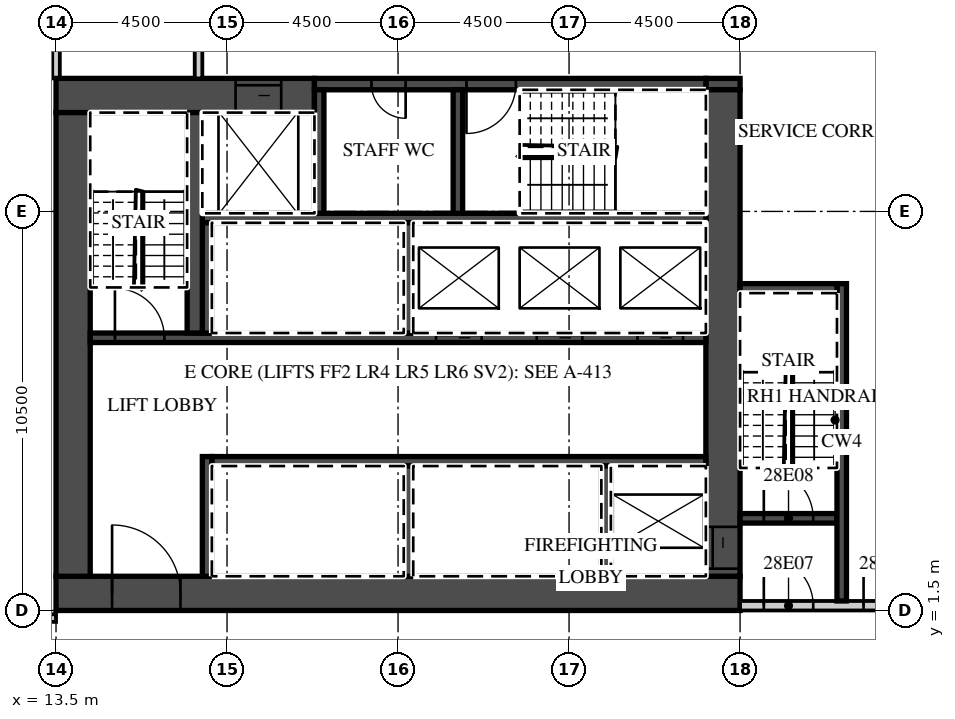
"""IFC4 building model, lengths in metres.
Left out: names, types, materials, properties, quantities, classifications, styles, units other than length and angle.
Written with IfcOpenShell. Run it as: python <this file> out.ifc"""

import sys

from ifc_helpers import new_model, si_unit, direction, frame, frame_2d, origin, place, context, subcontext, project, spatial, rectangle, extrude, element, fill, save


model = new_model("IFC4")
c1 = context("Model", 3, precision=1e-05, world=origin(), true_north=direction((0.0, 1.0)))
c2 = subcontext(c1, "Body", "Model", "MODEL_VIEW")
j1 = project(units=[si_unit("LENGTHUNIT", "METRE"), si_unit("PLANEANGLEUNIT", "RADIAN")], contexts=[c1])
p1 = place(None, origin())
s1 = spatial("IfcSite", under=j1, at=p1, CompositionType="ELEMENT")
p2 = place(p1, origin())
s2 = spatial("IfcBuilding", under=s1, at=p2, CompositionType="ELEMENT")
p3 = place(p2, frame((0.0, 0.0, 127.3)))
s3 = spatial("IfcBuildingStorey", under=s2, at=p3, CompositionType="ELEMENT", Elevation=127.3)
p4 = place(p3, frame((13.5, 15.5, 0.0), z_axis=(0.0, 0.0, 1.0), x_axis=(0.0, 1.0, 0.0)))
e1 = element("IfcWall", 1, at=p4, inside=s3, PredefinedType="PARTITIONING", context=c2, shape_type="SweptSolid", body=[
    extrude(rectangle(XDim=7.162, YDim=0.2, at=frame_2d((3.581, 0.0))), origin(), (0.0, 0.0, 1.0), 3.02),
])
p5 = place(p3, frame((-39.316, 1.3, 0.0), z_axis=(0.0, 0.0, 1.0), x_axis=(1.0, 0.0, 0.0)))
e2 = element("IfcWall", 2, at=p5, inside=s3, PredefinedType="PARTITIONING", context=c2, shape_type="SweptSolid", body=[
    extrude(rectangle(XDim=52.816, YDim=0.2, at=frame_2d((26.408, 0.0))), origin(), (0.0, 0.0, 1.0), 3.02),
])
p6 = place(p5, frame((0.15, 0.0, 0.0)))
e3 = element("IfcOpeningElement", 3, at=p6, cuts=e2, PredefinedType="OPENING", context=c2, shape_type="SweptSolid", body=[
    extrude(rectangle(XDim=0.9, YDim=2.1, at=frame_2d((0.45, 1.05))), frame((0.0, 0.11, 0.0), z_axis=(0.0, -1.0, 0.0), x_axis=(1.0, 0.0, 0.0)), (0.0, 0.0, 1.0), 0.22),
])
p7 = place(p5, frame((3.891, 0.0, 0.0)))
e4 = element("IfcOpeningElement", 4, at=p7, cuts=e2, PredefinedType="OPENING", context=c2, shape_type="SweptSolid", body=[
    extrude(rectangle(XDim=1.0, YDim=2.1, at=frame_2d((0.5, 1.05))), frame((0.0, 0.11, 0.0), z_axis=(0.0, -1.0, 0.0), x_axis=(1.0, 0.0, 0.0)), (0.0, 0.0, 1.0), 0.22),
])
p8 = place(p5, frame((10.741, 0.0, 0.0)))
e5 = element("IfcOpeningElement", 5, at=p8, cuts=e2, PredefinedType="OPENING", context=c2, shape_type="SweptSolid", body=[
    extrude(rectangle(XDim=1.0, YDim=2.1, at=frame_2d((0.5, 1.05))), frame((0.0, 0.11, 0.0), z_axis=(0.0, -1.0, 0.0), x_axis=(1.0, 0.0, 0.0)), (0.0, 0.0, 1.0), 0.22),
])
p9 = place(p5, frame((15.266, 0.0, 0.0)))
e6 = element("IfcOpeningElement", 6, at=p9, cuts=e2, PredefinedType="OPENING", context=c2, shape_type="SweptSolid", body=[
    extrude(rectangle(XDim=1.0, YDim=2.1, at=frame_2d((0.5, 1.05))), frame((0.0, 0.11, 0.0), z_axis=(0.0, -1.0, 0.0), x_axis=(1.0, 0.0, 0.0)), (0.0, 0.0, 1.0), 0.22),
])
p10 = place(p5, frame((19.741, 0.0, 0.0)))
e7 = element("IfcOpeningElement", 7, at=p10, cuts=e2, PredefinedType="OPENING", context=c2, shape_type="SweptSolid", body=[
    extrude(rectangle(XDim=1.0, YDim=2.1, at=frame_2d((0.5, 1.05))), frame((0.0, 0.11, 0.0), z_axis=(0.0, -1.0, 0.0), x_axis=(1.0, 0.0, 0.0)), (0.0, 0.0, 1.0), 0.22),
])
p11 = place(p5, frame((26.678, 0.0, 0.0)))
e8 = element("IfcOpeningElement", 8, at=p11, cuts=e2, PredefinedType="OPENING", context=c2, shape_type="SweptSolid", body=[
    extrude(rectangle(XDim=1.2, YDim=2.1, at=frame_2d((0.6, 1.05))), frame((0.0, 0.11, 0.0), z_axis=(0.0, -1.0, 0.0), x_axis=(1.0, 0.0, 0.0)), (0.0, 0.0, 1.0), 0.22),
])
p12 = place(p5, frame((35.678, 0.0, 0.0)))
e9 = element("IfcOpeningElement", 9, at=p12, cuts=e2, PredefinedType="OPENING", context=c2, shape_type="SweptSolid", body=[
    extrude(rectangle(XDim=1.2, YDim=2.1, at=frame_2d((0.6, 1.05))), frame((0.0, 0.11, 0.0), z_axis=(0.0, -1.0, 0.0), x_axis=(1.0, 0.0, 0.0)), (0.0, 0.0, 1.0), 0.22),
])
p13 = place(p5, frame((41.754, 0.0, 0.0)))
e10 = element("IfcOpeningElement", 10, at=p13, cuts=e2, PredefinedType="OPENING", context=c2, shape_type="SweptSolid", body=[
    extrude(rectangle(XDim=1.2, YDim=2.1, at=frame_2d((0.6, 1.05))), frame((0.0, 0.11, 0.0), z_axis=(0.0, -1.0, 0.0), x_axis=(1.0, 0.0, 0.0)), (0.0, 0.0, 1.0), 0.22),
])
p14 = place(p5, frame((51.241, 0.0, 0.0)))
e11 = element("IfcOpeningElement", 11, at=p14, cuts=e2, PredefinedType="OPENING", context=c2, shape_type="SweptSolid", body=[
    extrude(rectangle(XDim=1.0, YDim=2.1, at=frame_2d((0.5, 1.05))), frame((0.0, 0.11, 0.0), z_axis=(0.0, -1.0, 0.0), x_axis=(1.0, 0.0, 0.0)), (0.0, 0.0, 1.0), 0.22),
])
p15 = place(p3, frame((13.5, 1.95, 0.0), z_axis=(0.0, 0.0, 1.0), x_axis=(1.0, 0.0, 0.0)))
e12 = element("IfcWall", 12, at=p15, inside=s3, PredefinedType="SHEAR", context=c2, shape_type="SweptSolid", body=[
    extrude(rectangle(XDim=18.0, YDim=0.9, at=frame_2d((9.0, 0.0))), origin(), (0.0, 0.0, 1.0), 3.02),
])
p16 = place(p15, frame((1.475, 0.0, 0.0)))
e13 = element("IfcOpeningElement", 13, at=p16, cuts=e12, PredefinedType="OPENING", context=c2, shape_type="SweptSolid", body=[
    extrude(rectangle(XDim=1.8, YDim=2.1, at=frame_2d((0.9, 1.05))), frame((0.0, 0.46, 0.0), z_axis=(0.0, -1.0, 0.0), x_axis=(1.0, 0.0, 0.0)), (0.0, 0.0, 1.0), 0.92),
])
p17 = place(p3, frame((13.5, 15.05, 0.0), z_axis=(0.0, 0.0, 1.0), x_axis=(1.0, 0.0, 0.0)))
e14 = element("IfcWall", 14, at=p17, inside=s3, PredefinedType="SHEAR", context=c2, shape_type="SweptSolid", body=[
    extrude(rectangle(XDim=6.8, YDim=0.9, at=frame_2d((3.4, 0.0))), origin(), (0.0, 0.0, 1.0), 3.02),
])
p18 = place(p17, frame((4.725, 0.0, 0.0)))
e15 = element("IfcOpeningElement", 15, at=p18, cuts=e14, PredefinedType="OPENING", context=c2, shape_type="SweptSolid", body=[
    extrude(rectangle(XDim=1.2, YDim=2.1, at=frame_2d((0.6, 1.05))), frame((0.0, 0.46, 0.0), z_axis=(0.0, -1.0, 0.0), x_axis=(1.0, 0.0, 0.0)), (0.0, 0.0, 1.0), 0.92),
])
p19 = place(p3, frame((30.6, 15.35, 0.0), z_axis=(0.0, 0.0, 1.0), x_axis=(1.0, 0.0, 0.0)))
e16 = element("IfcWall", 16, at=p19, inside=s3, PredefinedType="SHEAR", context=c2, shape_type="SweptSolid", body=[
    extrude(rectangle(XDim=0.9, YDim=0.3, at=frame_2d((0.45, 0.0))), origin(), (0.0, 0.0, 1.0), 3.02),
])
p20 = place(p3, frame((20.3, 15.35, 0.0), z_axis=(0.0, 0.0, 1.0), x_axis=(1.0, 0.0, 0.0)))
e17 = element("IfcWall", 17, at=p20, inside=s3, PredefinedType="SHEAR", context=c2, shape_type="SweptSolid", body=[
    extrude(rectangle(XDim=10.3, YDim=0.3, at=frame_2d((5.15, 0.0))), origin(), (0.0, 0.0, 1.0), 3.02),
])
p21 = place(p20, frame((4.0, 0.0, 0.0)))
e18 = element("IfcOpeningElement", 18, at=p21, cuts=e17, PredefinedType="OPENING", context=c2, shape_type="SweptSolid", body=[
    extrude(rectangle(XDim=1.3, YDim=2.1, at=frame_2d((0.65, 1.05))), frame((0.0, 0.16, 0.0), z_axis=(0.0, -1.0, 0.0), x_axis=(1.0, 0.0, 0.0)), (0.0, 0.0, 1.0), 0.32),
])
p22 = place(p20, frame((1.5, 0.0, 0.0)))
e19 = element("IfcOpeningElement", 19, at=p22, cuts=e17, PredefinedType="OPENING", context=c2, shape_type="SweptSolid", body=[
    extrude(rectangle(XDim=0.9, YDim=2.1, at=frame_2d((0.45, 1.05))), frame((0.0, 0.16, 0.0), z_axis=(0.0, -1.0, 0.0), x_axis=(1.0, 0.0, 0.0)), (0.0, 0.0, 1.0), 0.32),
])
p23 = place(p3, frame((31.05, 2.4, 0.0), z_axis=(0.0, 0.0, 1.0), x_axis=(0.0, 1.0, 0.0)))
e20 = element("IfcWall", 20, at=p23, inside=s3, PredefinedType="SHEAR", context=c2, shape_type="SweptSolid", body=[
    extrude(rectangle(XDim=12.8, YDim=0.9, at=frame_2d((6.4, 0.0))), origin(), (0.0, 0.0, 1.0), 3.02),
])
p24 = place(p23, frame((0.2, 0.0, 0.0)))
e21 = element("IfcOpeningElement", 21, at=p24, cuts=e20, PredefinedType="OPENING", context=c2, shape_type="SweptSolid", body=[
    extrude(rectangle(XDim=1.1, YDim=2.1, at=frame_2d((0.55, 1.05))), frame((0.0, 0.46, 0.0), z_axis=(0.0, -1.0, 0.0), x_axis=(1.0, 0.0, 0.0)), (0.0, 0.0, 1.0), 0.92),
])
p25 = place(p3, frame((13.95, 2.4, 0.0), z_axis=(0.0, 0.0, 1.0), x_axis=(0.0, 1.0, 0.0)))
e22 = element("IfcWall", 22, at=p25, inside=s3, PredefinedType="SHEAR", context=c2, shape_type="SweptSolid", body=[
    extrude(rectangle(XDim=12.2, YDim=0.9, at=frame_2d((6.1, 0.0))), origin(), (0.0, 0.0, 1.0), 3.02),
])
p26 = place(p3, frame((17.6, 5.425, 0.0), z_axis=(0.0, 0.0, 1.0), x_axis=(1.0, 0.0, 0.0)))
e23 = element("IfcWall", 23, at=p26, inside=s3, PredefinedType="SHEAR", context=c2, shape_type="SweptSolid", body=[
    extrude(rectangle(XDim=13.0, YDim=0.25, at=frame_2d((6.5, 0.0))), origin(), (0.0, 0.0, 1.0), 3.02),
])
p27 = place(p3, frame((17.475, 2.4, 0.0), z_axis=(0.0, 0.0, 1.0), x_axis=(0.0, 1.0, 0.0)))
e24 = element("IfcWall", 24, at=p27, inside=s3, PredefinedType="SHEAR", context=c2, shape_type="SweptSolid", body=[
    extrude(rectangle(XDim=3.15, YDim=0.25, at=frame_2d((1.575, 0.0))), origin(), (0.0, 0.0, 1.0), 3.02),
])
for number, where, z_axis, x_axis in (
    (25, (27.975, 2.4, 0.0), (0.0, 0.0, 1.0), (0.0, 1.0, 0.0)),
    (26, (22.775, 2.4, 0.0), (0.0, 0.0, 1.0), (0.0, 1.0, 0.0)),
):
    element("IfcWall", number, at=place(p3, frame(where, z_axis=z_axis, x_axis=x_axis)), inside=s3, PredefinedType="SHEAR", context=c2, shape_type="SweptSolid", body=[
        extrude(rectangle(XDim=2.9, YDim=0.25, at=frame_2d((1.45, 0.0))), origin(), (0.0, 0.0, 1.0), 3.02),
    ])
p28 = place(p3, frame((14.4, 8.675, 0.0), z_axis=(0.0, 0.0, 1.0), x_axis=(1.0, 0.0, 0.0)))
e27 = element("IfcWall", 27, at=p28, inside=s3, PredefinedType="SHEAR", context=c2, shape_type="SweptSolid", body=[
    extrude(rectangle(XDim=16.2, YDim=0.25, at=frame_2d((8.1, 0.0))), origin(), (0.0, 0.0, 1.0), 3.02),
])
p29 = place(p28, frame((14.4, 0.0, 0.0)))
e28 = element("IfcOpeningElement", 28, at=p29, cuts=e27, PredefinedType="OPENING", context=c2, shape_type="SweptSolid", body=[
    extrude(rectangle(XDim=1.2, YDim=2.1, at=frame_2d((0.6, 1.05))), frame((0.0, 0.135, 0.0), z_axis=(0.0, -1.0, 0.0), x_axis=(1.0, 0.0, 0.0)), (0.0, 0.0, 1.0), 0.27),
])
p30 = place(p28, frame((11.75, 0.0, 0.0)))
e29 = element("IfcOpeningElement", 29, at=p30, cuts=e27, PredefinedType="OPENING", context=c2, shape_type="SweptSolid", body=[
    extrude(rectangle(XDim=1.2, YDim=2.1, at=frame_2d((0.6, 1.05))), frame((0.0, 0.135, 0.0), z_axis=(0.0, -1.0, 0.0), x_axis=(1.0, 0.0, 0.0)), (0.0, 0.0, 1.0), 0.27),
])
p31 = place(p28, frame((9.1, 0.0, 0.0)))
e30 = element("IfcOpeningElement", 30, at=p31, cuts=e27, PredefinedType="OPENING", context=c2, shape_type="SweptSolid", body=[
    extrude(rectangle(XDim=1.2, YDim=2.1, at=frame_2d((0.6, 1.05))), frame((0.0, 0.135, 0.0), z_axis=(0.0, -1.0, 0.0), x_axis=(1.0, 0.0, 0.0)), (0.0, 0.0, 1.0), 0.27),
])
p32 = place(p28, frame((0.65, 0.0, 0.0)))
e31 = element("IfcOpeningElement", 31, at=p32, cuts=e27, PredefinedType="OPENING", context=c2, shape_type="SweptSolid", body=[
    extrude(rectangle(XDim=1.3, YDim=2.1, at=frame_2d((0.65, 1.05))), frame((0.0, 0.135, 0.0), z_axis=(0.0, -1.0, 0.0), x_axis=(1.0, 0.0, 0.0)), (0.0, 0.0, 1.0), 0.27),
])
p33 = place(p3, frame((17.35, 11.825, 0.0), z_axis=(0.0, 0.0, 1.0), x_axis=(1.0, 0.0, 0.0)))
e32 = element("IfcWall", 32, at=p33, inside=s3, PredefinedType="SHEAR", context=c2, shape_type="SweptSolid", body=[
    extrude(rectangle(XDim=13.25, YDim=0.25, at=frame_2d((6.625, 0.0))), origin(), (0.0, 0.0, 1.0), 3.02),
])
for number, where, z_axis, x_axis in (
    (33, (17.475, 8.8, 0.0), (0.0, 0.0, 1.0), (0.0, 1.0, 0.0)),
    (34, (22.775, 8.8, 0.0), (0.0, 0.0, 1.0), (0.0, 1.0, 0.0)),
):
    element("IfcWall", number, at=place(p3, frame(where, z_axis=z_axis, x_axis=x_axis)), inside=s3, PredefinedType="SHEAR", context=c2, shape_type="SweptSolid", body=[
        extrude(rectangle(XDim=2.9, YDim=0.25, at=frame_2d((1.45, 0.0))), origin(), (0.0, 0.0, 1.0), 3.02),
    ])
p34 = place(p3, frame((17.15, 8.8, 0.0), z_axis=(0.0, 0.0, 1.0), x_axis=(0.0, 1.0, 0.0)))
e35 = element("IfcWall", 35, at=p34, inside=s3, PredefinedType="SHEAR", context=c2, shape_type="SweptSolid", body=[
    extrude(rectangle(XDim=5.8, YDim=0.4, at=frame_2d((2.9, 0.0))), origin(), (0.0, 0.0, 1.0), 3.02),
])
for number, where, z_axis, x_axis in (
    (36, (20.425, 11.95, 0.0), (0.0, 0.0, 1.0), (0.0, 1.0, 0.0)),
    (37, (24.075, 11.95, 0.0), (0.0, 0.0, 1.0), (0.0, 1.0, 0.0)),
):
    element("IfcWall", number, at=place(p3, frame(where, z_axis=z_axis, x_axis=x_axis)), inside=s3, PredefinedType="SHEAR", context=c2, shape_type="SweptSolid", body=[
        extrude(rectangle(XDim=3.25, YDim=0.25, at=frame_2d((1.625, 0.0))), origin(), (0.0, 0.0, 1.0), 3.02),
    ])
p35 = place(p3, frame((31.5, 1.625, 0.0), z_axis=(0.0, 0.0, 1.0), x_axis=(1.0, 0.0, 0.0)))
e38 = element("IfcWall", 38, at=p35, inside=s3, PredefinedType="PARTITIONING", context=c2, shape_type="SweptSolid", body=[
    extrude(rectangle(XDim=15.65, YDim=0.25, at=frame_2d((7.825, 0.0))), origin(), (0.0, 0.0, 1.0), 3.02),
])
p36 = place(p35, frame((0.625, 0.0, 0.0)))
e39 = element("IfcOpeningElement", 39, at=p36, cuts=e38, PredefinedType="OPENING", context=c2, shape_type="SweptSolid", body=[
    extrude(rectangle(XDim=1.3, YDim=2.1, at=frame_2d((0.65, 1.05))), frame((0.0, 0.135, 0.0), z_axis=(0.0, -1.0, 0.0), x_axis=(1.0, 0.0, 0.0)), (0.0, 0.0, 1.0), 0.27),
])
p37 = place(p35, frame((3.25, 0.0, 0.0)))
e40 = element("IfcOpeningElement", 40, at=p37, cuts=e38, PredefinedType="OPENING", context=c2, shape_type="SweptSolid", body=[
    extrude(rectangle(XDim=1.1, YDim=2.1, at=frame_2d((0.55, 1.05))), frame((0.0, 0.135, 0.0), z_axis=(0.0, -1.0, 0.0), x_axis=(1.0, 0.0, 0.0)), (0.0, 0.0, 1.0), 0.27),
])
p38 = place(p3, frame((31.5, 3.925, 0.0), z_axis=(0.0, 0.0, 1.0), x_axis=(1.0, 0.0, 0.0)))
e41 = element("IfcWall", 41, at=p38, inside=s3, PredefinedType="SHEAR", context=c2, shape_type="SweptSolid", body=[
    extrude(rectangle(XDim=2.55, YDim=0.25, at=frame_2d((1.275, 0.0))), origin(), (0.0, 0.0, 1.0), 3.02),
])
p39 = place(p38, frame((0.625, 0.0, 0.0)))
e42 = element("IfcOpeningElement", 42, at=p39, cuts=e41, PredefinedType="OPENING", context=c2, shape_type="SweptSolid", body=[
    extrude(rectangle(XDim=1.3, YDim=2.1, at=frame_2d((0.65, 1.05))), frame((0.0, 0.135, 0.0), z_axis=(0.0, -1.0, 0.0), x_axis=(1.0, 0.0, 0.0)), (0.0, 0.0, 1.0), 0.27),
])
p40 = place(p3, frame((34.175, 1.75, 0.0), z_axis=(0.0, 0.0, 1.0), x_axis=(0.0, 1.0, 0.0)))
e43 = element("IfcWall", 43, at=p40, inside=s3, PredefinedType="SHEAR", context=c2, shape_type="SweptSolid", body=[
    extrude(rectangle(XDim=8.35, YDim=0.25, at=frame_2d((4.175, 0.0))), origin(), (0.0, 0.0, 1.0), 3.02),
])
p41 = place(p3, frame((31.5, 9.975, 0.0), z_axis=(0.0, 0.0, 1.0), x_axis=(1.0, 0.0, 0.0)))
e44 = element("IfcWall", 44, at=p41, inside=s3, PredefinedType="SHEAR", context=c2, shape_type="SweptSolid", body=[
    extrude(rectangle(XDim=2.55, YDim=0.25, at=frame_2d((1.275, 0.0))), origin(), (0.0, 0.0, 1.0), 3.02),
])
p42 = place(p3, frame((17.25, 15.5, 0.0), z_axis=(0.0, 0.0, 1.0), x_axis=(0.0, 1.0, 0.0)))
e45 = element("IfcWall", 45, at=p42, inside=s3, PredefinedType="PARTITIONING", context=c2, shape_type="SweptSolid", body=[
    extrude(rectangle(XDim=2.2, YDim=0.2, at=frame_2d((1.1, 0.0))), origin(), (0.0, 0.0, 1.0), 3.02),
])
p43 = place(p29, origin())
e46 = element("IfcDoor", 46, at=p43, inside=s3, OperationType="SLIDING_TO_LEFT", PredefinedType="DOOR", context=c2, shape_type="SweptSolid", body=[
    extrude(rectangle(XDim=1.2, YDim=2.1, at=frame_2d((0.6, 1.05))), frame((0.0, 0.025, 0.0), z_axis=(0.0, -1.0, 0.0), x_axis=(1.0, 0.0, 0.0)), (0.0, 0.0, 1.0), 0.05),
])
fill(e28, e46)
p44 = place(p30, origin())
e47 = element("IfcDoor", 47, at=p44, inside=s3, OperationType="SLIDING_TO_RIGHT", PredefinedType="DOOR", context=c2, shape_type="SweptSolid", body=[
    extrude(rectangle(XDim=1.2, YDim=2.1, at=frame_2d((0.6, 1.05))), frame((0.0, 0.025, 0.0), z_axis=(0.0, -1.0, 0.0), x_axis=(1.0, 0.0, 0.0)), (0.0, 0.0, 1.0), 0.05),
])
fill(e29, e47)
p45 = place(p31, origin())
e48 = element("IfcDoor", 48, at=p45, inside=s3, OperationType="SLIDING_TO_RIGHT", PredefinedType="DOOR", context=c2, shape_type="SweptSolid", body=[
    extrude(rectangle(XDim=1.2, YDim=2.1, at=frame_2d((0.6, 1.05))), frame((0.0, 0.025, 0.0), z_axis=(0.0, -1.0, 0.0), x_axis=(1.0, 0.0, 0.0)), (0.0, 0.0, 1.0), 0.05),
])
fill(e30, e48)
p46 = place(p18, origin())
e49 = element("IfcDoor", 49, at=p46, inside=s3, OperationType="SLIDING_TO_LEFT", PredefinedType="DOOR", context=c2, shape_type="SweptSolid", body=[
    extrude(rectangle(XDim=1.2, YDim=2.1, at=frame_2d((0.6, 1.05))), frame((0.0, 0.025, 0.0), z_axis=(0.0, -1.0, 0.0), x_axis=(1.0, 0.0, 0.0)), (0.0, 0.0, 1.0), 0.05),
])
fill(e15, e49)
p47 = place(p24, origin())
e50 = element("IfcDoor", 50, at=p47, inside=s3, OperationType="SLIDING_TO_LEFT", PredefinedType="DOOR", context=c2, shape_type="SweptSolid", body=[
    extrude(rectangle(XDim=1.1, YDim=2.1, at=frame_2d((0.55, 1.05))), frame((0.0, 0.025, 0.0), z_axis=(0.0, -1.0, 0.0), x_axis=(1.0, 0.0, 0.0)), (0.0, 0.0, 1.0), 0.05),
])
fill(e21, e50)
p48 = place(p16, origin())
e51 = element("IfcDoor", 51, at=p48, inside=s3, OperationType="DOUBLE_DOOR_DOUBLE_SWING", PredefinedType="DOOR", context=c2, shape_type="SweptSolid", body=[
    extrude(rectangle(XDim=1.8, YDim=2.1, at=frame_2d((0.9, 1.05))), frame((0.0, 0.025, 0.0), z_axis=(0.0, -1.0, 0.0), x_axis=(1.0, 0.0, 0.0)), (0.0, 0.0, 1.0), 0.05),
])
fill(e13, e51)
p49 = place(p36, origin())
e52 = element("IfcDoor", 52, at=p49, inside=s3, OperationType="SINGLE_SWING_LEFT", PredefinedType="DOOR", context=c2, shape_type="SweptSolid", body=[
    extrude(rectangle(XDim=1.3, YDim=2.1, at=frame_2d((0.65, 1.05))), frame((0.0, 0.025, 0.0), z_axis=(0.0, -1.0, 0.0), x_axis=(1.0, 0.0, 0.0)), (0.0, 0.0, 1.0), 0.05),
])
fill(e39, e52)
p50 = place(p39, origin())
e53 = element("IfcDoor", 53, at=p50, inside=s3, OperationType="SINGLE_SWING_LEFT", PredefinedType="DOOR", context=c2, shape_type="SweptSolid", body=[
    extrude(rectangle(XDim=1.3, YDim=2.1, at=frame_2d((0.65, 1.05))), frame((0.0, 0.025, 0.0), z_axis=(0.0, -1.0, 0.0), x_axis=(1.0, 0.0, 0.0)), (0.0, 0.0, 1.0), 0.05),
])
fill(e42, e53)
p51 = place(p37, origin())
e54 = element("IfcDoor", 54, at=p51, inside=s3, OperationType="SINGLE_SWING_LEFT", PredefinedType="DOOR", context=c2, shape_type="SweptSolid", body=[
    extrude(rectangle(XDim=1.1, YDim=2.1, at=frame_2d((0.55, 1.05))), frame((0.0, 0.025, 0.0), z_axis=(0.0, -1.0, 0.0), x_axis=(1.0, 0.0, 0.0)), (0.0, 0.0, 1.0), 0.05),
])
fill(e40, e54)
p52 = place(p32, origin())
e55 = element("IfcDoor", 55, at=p52, inside=s3, OperationType="SINGLE_SWING_LEFT", PredefinedType="DOOR", context=c2, shape_type="SweptSolid", body=[
    extrude(rectangle(XDim=1.3, YDim=2.1, at=frame_2d((0.65, 1.05))), frame((0.0, 0.025, 0.0), z_axis=(0.0, -1.0, 0.0), x_axis=(1.0, 0.0, 0.0)), (0.0, 0.0, 1.0), 0.05),
])
fill(e31, e55)
p53 = place(p21, origin())
e56 = element("IfcDoor", 56, at=p53, inside=s3, OperationType="SINGLE_SWING_LEFT", PredefinedType="DOOR", context=c2, shape_type="SweptSolid", body=[
    extrude(rectangle(XDim=1.3, YDim=2.1, at=frame_2d((0.65, 1.05))), frame((0.0, 0.025, 0.0), z_axis=(0.0, -1.0, 0.0), x_axis=(1.0, 0.0, 0.0)), (0.0, 0.0, 1.0), 0.05),
])
fill(e18, e56)
p54 = place(p22, origin())
e57 = element("IfcDoor", 57, at=p54, inside=s3, OperationType="SINGLE_SWING_RIGHT", PredefinedType="DOOR", context=c2, shape_type="SweptSolid", body=[
    extrude(rectangle(XDim=0.9, YDim=2.1, at=frame_2d((0.45, 1.05))), frame((0.0, 0.025, 0.0), z_axis=(0.0, -1.0, 0.0), x_axis=(1.0, 0.0, 0.0)), (0.0, 0.0, 1.0), 0.05),
])
fill(e19, e57)
save(model, sys.argv[1])
